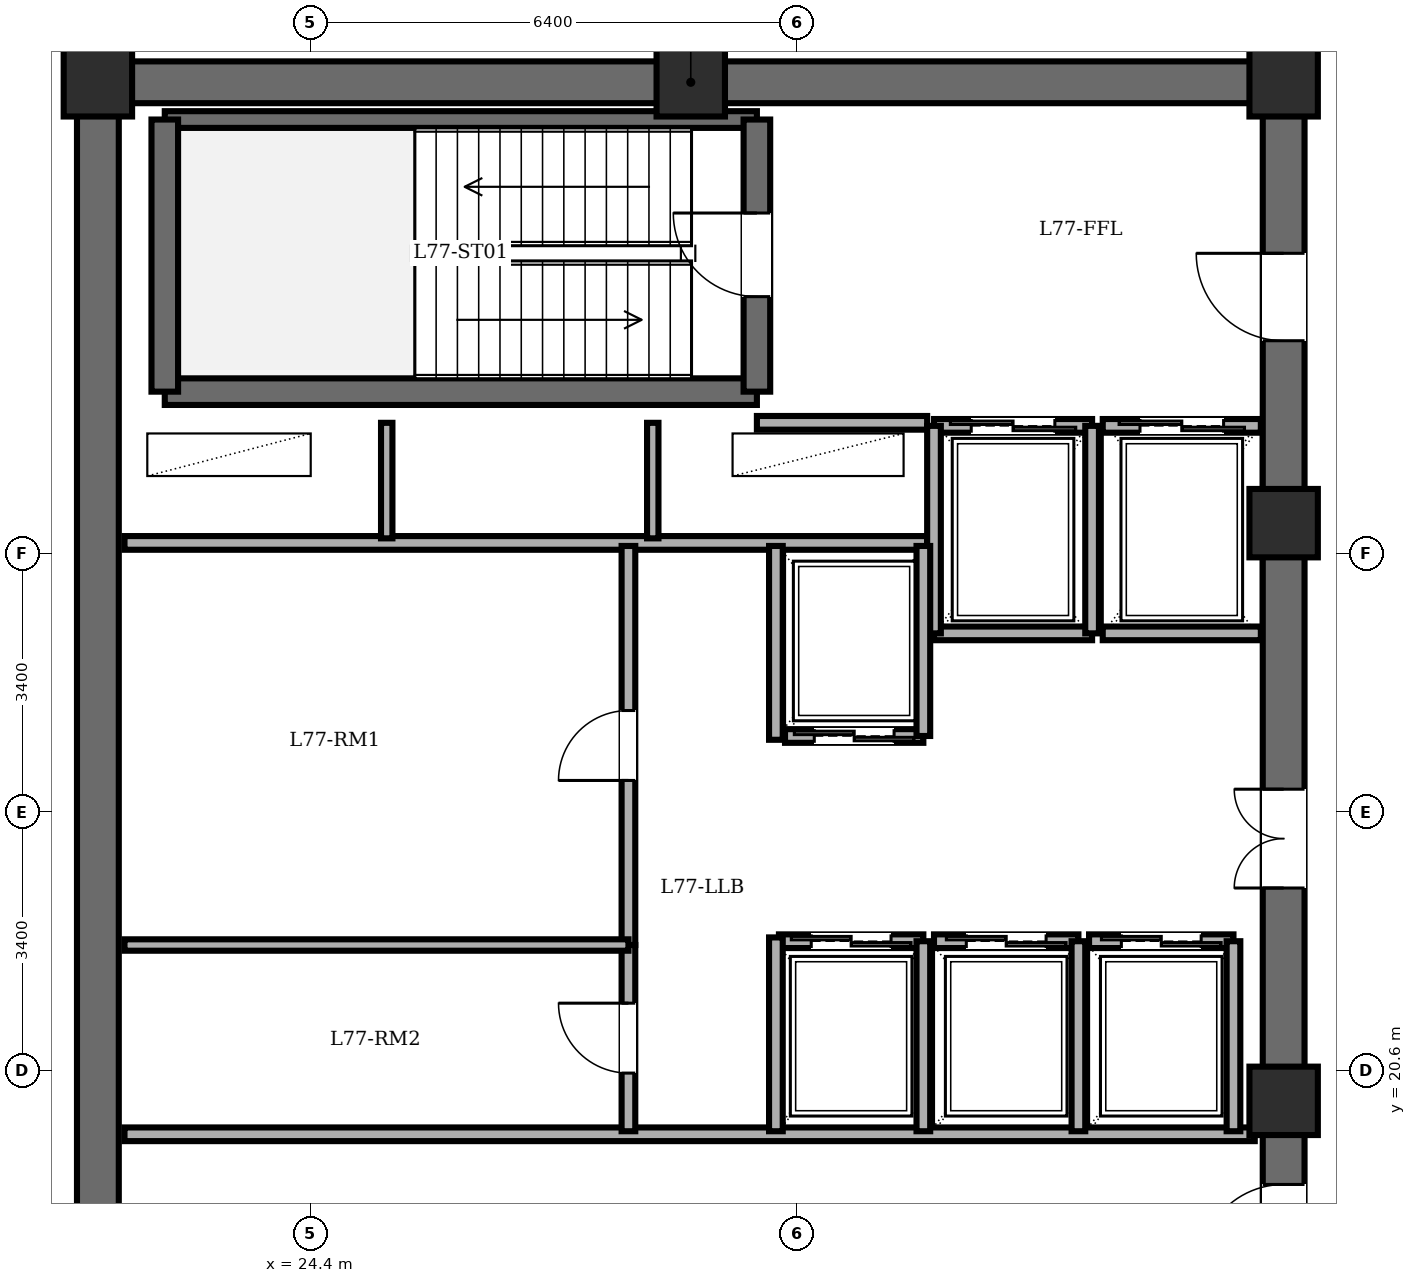
"""IFC4 building model, lengths in metres.
Left out: names, types, materials, properties, quantities, classifications, styles, units other than length and angle.
Written with IfcOpenShell. Run it as: python <this file> out.ifc"""

import sys

from ifc_helpers import new_model, si_unit, direction, frame, frame_2d, origin, origin_2d, place, context, subcontext, project, spatial, rectangle, extrude, element, fill, save


model = new_model("IFC4")
c1 = context("Model", 3, precision=1e-05, world=origin(), true_north=direction((0.0, 1.0)))
c2 = subcontext(c1, "Body", "Model", "MODEL_VIEW")
j1 = project(units=[si_unit("LENGTHUNIT", "METRE"), si_unit("PLANEANGLEUNIT", "RADIAN")], contexts=[c1])
p1 = place(None, origin())
s1 = spatial("IfcSite", under=j1, at=p1, CompositionType="ELEMENT")
p2 = place(p1, origin())
s2 = spatial("IfcBuilding", under=s1, at=p2, CompositionType="ELEMENT")
p3 = place(p2, frame((0.0, 0.0, 295.3)))
s3 = spatial("IfcBuildingStorey", under=s2, at=p3, CompositionType="ELEMENT", Elevation=295.3)
for number, where, z_axis, x_axis in (
    (1, (37.2, 20.2, 0.0), (0.0, 0.0, 1.0), (1.0, 0.0, 0.0)),
    (2, (37.2, 27.8, 0.0), (0.0, 0.0, 1.0), (1.0, 0.0, 0.0)),
    (3, (37.2, 33.6, 0.0), (0.0, 0.0, 1.0), (1.0, 0.0, 0.0)),
    (4, (29.4, 33.6, 0.0), (0.0, 0.0, 1.0), (1.0, 0.0, 0.0)),
    (5, (21.6, 33.6, 0.0), (0.0, 0.0, 1.0), (1.0, 0.0, 0.0)),
):
    element("IfcColumn", number, at=place(p3, frame(where, z_axis=z_axis, x_axis=x_axis)), inside=s3, PredefinedType="COLUMN", context=c2, shape_type="SweptSolid", body=[
        extrude(rectangle(XDim=0.9, YDim=0.9, at=origin_2d()), origin(), (0.0, 0.0, 1.0), 5.1),
    ])
p4 = place(p3, frame((21.6, 14.4, 0.0), z_axis=(0.0, 0.0, 1.0), x_axis=(0.0, 1.0, 0.0)))
e6 = element("IfcWall", 6, at=p4, inside=s3, PredefinedType="SHEAR", context=c2, shape_type="SweptSolid", body=[
    extrude(rectangle(XDim=19.2, YDim=0.55, at=frame_2d((9.6, 0.0))), origin(), (0.0, 0.0, 1.0), 4.85),
])
p5 = place(p3, frame((21.6, 33.6, 0.0), z_axis=(0.0, 0.0, 1.0), x_axis=(1.0, 0.0, 0.0)))
e7 = element("IfcWall", 7, at=p5, inside=s3, PredefinedType="SHEAR", context=c2, shape_type="SweptSolid", body=[
    extrude(rectangle(XDim=15.6, YDim=0.55, at=frame_2d((7.8, 0.0))), origin(), (0.0, 0.0, 1.0), 4.85),
])
p6 = place(p3, frame((37.2, 14.4, 0.0), z_axis=(0.0, 0.0, 1.0), x_axis=(0.0, 1.0, 0.0)))
e8 = element("IfcWall", 8, at=p6, inside=s3, PredefinedType="SHEAR", context=c2, shape_type="SweptSolid", body=[
    extrude(rectangle(XDim=19.2, YDim=0.55, at=frame_2d((9.6, 0.0))), origin(), (0.0, 0.0, 1.0), 4.85),
])
p7 = place(p6, frame((15.8, 0.0, 0.0)))
e9 = element("IfcOpeningElement", 9, at=p7, cuts=e8, PredefinedType="OPENING", context=c2, shape_type="SweptSolid", body=[
    extrude(rectangle(XDim=1.15, YDim=2.15, at=frame_2d((0.575, 1.075))), frame((0.0, 0.285, 0.0), z_axis=(0.0, -1.0, 0.0), x_axis=(1.0, 0.0, 0.0)), (0.0, 0.0, 1.0), 0.57),
])
p8 = place(p6, frame((3.6, 0.0, 0.0)))
e10 = element("IfcOpeningElement", 10, at=p8, cuts=e8, PredefinedType="OPENING", context=c2, shape_type="SweptSolid", body=[
    extrude(rectangle(XDim=1.1, YDim=2.15, at=frame_2d((0.55, 1.075))), frame((0.0, 0.285, 0.0), z_axis=(0.0, -1.0, 0.0), x_axis=(1.0, 0.0, 0.0)), (0.0, 0.0, 1.0), 0.57),
])
p9 = place(p6, frame((8.6, 0.0, 0.0)))
e11 = element("IfcOpeningElement", 11, at=p9, cuts=e8, PredefinedType="OPENING", context=c2, shape_type="SweptSolid", body=[
    extrude(rectangle(XDim=1.3, YDim=2.2, at=frame_2d((0.65, 1.1))), frame((0.0, 0.285, 0.0), z_axis=(0.0, -1.0, 0.0), x_axis=(1.0, 0.0, 0.0)), (0.0, 0.0, 1.0), 0.57),
])
p10 = place(p3, frame((22.48, 29.53, 0.0), z_axis=(0.0, 0.0, 1.0), x_axis=(1.0, 0.0, 0.0)))
e12 = element("IfcWall", 12, at=p10, inside=s3, PredefinedType="SOLIDWALL", context=c2, shape_type="SweptSolid", body=[
    extrude(rectangle(XDim=7.79, YDim=0.35, at=frame_2d((3.895, 0.0))), origin(), (0.0, 0.0, 1.0), 4.85),
])
p11 = place(p3, frame((22.48, 33.11, 0.0), z_axis=(0.0, 0.0, 1.0), x_axis=(1.0, 0.0, 0.0)))
e13 = element("IfcWall", 13, at=p11, inside=s3, PredefinedType="PARTITIONING", context=c2, shape_type="SweptSolid", body=[
    extrude(rectangle(XDim=7.79, YDim=0.22, at=frame_2d((3.895, 0.0))), origin(), (0.0, 0.0, 1.0), 4.85),
])
p12 = place(p3, frame((22.48, 29.53, 0.0), z_axis=(0.0, 0.0, 1.0), x_axis=(0.0, 1.0, 0.0)))
e14 = element("IfcWall", 14, at=p12, inside=s3, PredefinedType="SOLIDWALL", context=c2, shape_type="SweptSolid", body=[
    extrude(rectangle(XDim=3.58, YDim=0.35, at=frame_2d((1.79, 0.0))), origin(), (0.0, 0.0, 1.0), 4.85),
])
p13 = place(p3, frame((30.27, 29.53, 0.0), z_axis=(0.0, 0.0, 1.0), x_axis=(0.0, 1.0, 0.0)))
e15 = element("IfcWall", 15, at=p13, inside=s3, PredefinedType="SOLIDWALL", context=c2, shape_type="SweptSolid", body=[
    extrude(rectangle(XDim=3.58, YDim=0.35, at=frame_2d((1.79, 0.0))), origin(), (0.0, 0.0, 1.0), 4.85),
])
p14 = place(p13, frame((1.25, 0.0, 0.0)))
e16 = element("IfcOpeningElement", 16, at=p14, cuts=e15, PredefinedType="OPENING", context=c2, shape_type="SweptSolid", body=[
    extrude(rectangle(XDim=1.1, YDim=2.15, at=frame_2d((0.55, 1.075))), frame((0.0, 0.185, 0.0), z_axis=(0.0, -1.0, 0.0), x_axis=(1.0, 0.0, 0.0)), (0.0, 0.0, 1.0), 0.37),
])
p15 = place(p3, frame((30.27, 29.12, 0.0), z_axis=(0.0, 0.0, 1.0), x_axis=(1.0, 0.0, 0.0)))
e17 = element("IfcWall", 17, at=p15, inside=s3, PredefinedType="PARTITIONING", context=c2, shape_type="SweptSolid", body=[
    extrude(rectangle(XDim=2.24, YDim=0.18, at=frame_2d((1.12, 0.0))), origin(), (0.0, 0.0, 1.0), 4.85),
])
p16 = place(p3, frame((21.95, 27.54, 0.0), z_axis=(0.0, 0.0, 1.0), x_axis=(1.0, 0.0, 0.0)))
e18 = element("IfcWall", 18, at=p16, inside=s3, PredefinedType="PARTITIONING", context=c2, shape_type="SweptSolid", body=[
    extrude(rectangle(XDim=10.56, YDim=0.18, at=frame_2d((5.28, 0.0))), origin(), (0.0, 0.0, 1.0), 4.85),
])
for number, where, z_axis, x_axis in (
    (19, (25.4, 27.6, 0.0), (0.0, 0.0, 1.0), (0.0, 1.0, 0.0)),
    (20, (28.9, 27.6, 0.0), (0.0, 0.0, 1.0), (0.0, 1.0, 0.0)),
):
    element("IfcWall", number, at=place(p3, frame(where, z_axis=z_axis, x_axis=x_axis)), inside=s3, PredefinedType="PARTITIONING", context=c2, shape_type="SweptSolid", body=[
        extrude(rectangle(XDim=1.52, YDim=0.15, at=frame_2d((0.76, 0.0))), origin(), (0.0, 0.0, 1.0), 4.85),
    ])
p17 = place(p3, frame((21.95, 19.76, 0.0), z_axis=(0.0, 0.0, 1.0), x_axis=(1.0, 0.0, 0.0)))
e21 = element("IfcWall", 21, at=p17, inside=s3, PredefinedType="PARTITIONING", context=c2, shape_type="SweptSolid", body=[
    extrude(rectangle(XDim=14.87, YDim=0.18, at=frame_2d((7.435, 0.0))), origin(), (0.0, 0.0, 1.0), 4.85),
])
p18 = place(p3, frame((32.6, 29.08, 0.0), z_axis=(0.0, 0.0, 1.0), x_axis=(1.0, 0.0, 0.0)))
e22 = element("IfcWall", 22, at=p18, inside=s3, PredefinedType="PARTITIONING", context=c2, shape_type="SweptSolid", body=[
    extrude(rectangle(XDim=2.08, YDim=0.18, at=frame_2d((1.04, 0.0))), origin(), (0.0, 0.0, 1.0), 4.85),
])
p19 = place(p18, frame((0.49, 0.0, 0.0)))
e23 = element("IfcOpeningElement", 23, at=p19, cuts=e22, PredefinedType="OPENING", context=c2, shape_type="SweptSolid", body=[
    extrude(rectangle(XDim=1.1, YDim=2.2, at=frame_2d((0.55, 1.1))), frame((0.0, 0.1, 0.0), z_axis=(0.0, -1.0, 0.0), x_axis=(1.0, 0.0, 0.0)), (0.0, 0.0, 1.0), 0.2),
])
p20 = place(p3, frame((34.68, 26.35, 0.0), z_axis=(0.0, 0.0, 1.0), x_axis=(-1.0, 0.0, 0.0)))
e24 = element("IfcWall", 24, at=p20, inside=s3, PredefinedType="PARTITIONING", context=c2, shape_type="SweptSolid", body=[
    extrude(rectangle(XDim=2.08, YDim=0.18, at=frame_2d((1.04, 0.0))), origin(), (0.0, 0.0, 1.0), 4.85),
])
for number, where, z_axis, x_axis in (
    (25, (34.68, 26.35, 0.0), (0.0, 0.0, 1.0), (0.0, 1.0, 0.0)),
    (26, (32.6, 29.08, 0.0), (0.0, 0.0, 1.0), (0.0, -1.0, 0.0)),
):
    element("IfcWall", number, at=place(p3, frame(where, z_axis=z_axis, x_axis=x_axis)), inside=s3, PredefinedType="PARTITIONING", context=c2, shape_type="SweptSolid", body=[
        extrude(rectangle(XDim=2.73, YDim=0.18, at=frame_2d((1.365, 0.0))), origin(), (0.0, 0.0, 1.0), 4.85),
    ])
p21 = place(p3, frame((34.82, 29.08, 0.0), z_axis=(0.0, 0.0, 1.0), x_axis=(1.0, 0.0, 0.0)))
e27 = element("IfcWall", 27, at=p21, inside=s3, PredefinedType="PARTITIONING", context=c2, shape_type="SweptSolid", body=[
    extrude(rectangle(XDim=2.08, YDim=0.18, at=frame_2d((1.04, 0.0))), origin(), (0.0, 0.0, 1.0), 4.85),
])
p22 = place(p21, frame((0.49, 0.0, 0.0)))
e28 = element("IfcOpeningElement", 28, at=p22, cuts=e27, PredefinedType="OPENING", context=c2, shape_type="SweptSolid", body=[
    extrude(rectangle(XDim=1.1, YDim=2.2, at=frame_2d((0.55, 1.1))), frame((0.0, 0.1, 0.0), z_axis=(0.0, -1.0, 0.0), x_axis=(1.0, 0.0, 0.0)), (0.0, 0.0, 1.0), 0.2),
])
p23 = place(p3, frame((36.9, 26.35, 0.0), z_axis=(0.0, 0.0, 1.0), x_axis=(-1.0, 0.0, 0.0)))
e29 = element("IfcWall", 29, at=p23, inside=s3, PredefinedType="PARTITIONING", context=c2, shape_type="SweptSolid", body=[
    extrude(rectangle(XDim=2.08, YDim=0.18, at=frame_2d((1.04, 0.0))), origin(), (0.0, 0.0, 1.0), 4.85),
])
p24 = place(p3, frame((32.46, 25.0, 0.0), z_axis=(0.0, 0.0, 1.0), x_axis=(-1.0, 0.0, 0.0)))
e30 = element("IfcWall", 30, at=p24, inside=s3, PredefinedType="PARTITIONING", context=c2, shape_type="SweptSolid", body=[
    extrude(rectangle(XDim=1.82, YDim=0.18, at=frame_2d((0.91, 0.0))), origin(), (0.0, 0.0, 1.0), 4.85),
])
p25 = place(p24, frame((0.385, 0.0, 0.0)))
e31 = element("IfcOpeningElement", 31, at=p25, cuts=e30, PredefinedType="OPENING", context=c2, shape_type="SweptSolid", body=[
    extrude(rectangle(XDim=1.05, YDim=2.2, at=frame_2d((0.525, 1.1))), frame((0.0, 0.1, 0.0), z_axis=(0.0, -1.0, 0.0), x_axis=(1.0, 0.0, 0.0)), (0.0, 0.0, 1.0), 0.2),
])
p26 = place(p3, frame((32.46, 25.0, 0.0), z_axis=(0.0, 0.0, 1.0), x_axis=(0.0, 1.0, 0.0)))
e32 = element("IfcWall", 32, at=p26, inside=s3, PredefinedType="PARTITIONING", context=c2, shape_type="SweptSolid", body=[
    extrude(rectangle(XDim=2.5, YDim=0.18, at=frame_2d((1.25, 0.0))), origin(), (0.0, 0.0, 1.0), 4.85),
])
p27 = place(p3, frame((30.56, 22.3, 0.0), z_axis=(0.0, 0.0, 1.0), x_axis=(1.0, 0.0, 0.0)))
e33 = element("IfcWall", 33, at=p27, inside=s3, PredefinedType="PARTITIONING", context=c2, shape_type="SweptSolid", body=[
    extrude(rectangle(XDim=1.9, YDim=0.18, at=frame_2d((0.95, 0.0))), origin(), (0.0, 0.0, 1.0), 4.85),
])
p28 = place(p27, frame((0.425, 0.0, 0.0)))
e34 = element("IfcOpeningElement", 34, at=p28, cuts=e33, PredefinedType="OPENING", context=c2, shape_type="SweptSolid", body=[
    extrude(rectangle(XDim=1.05, YDim=2.2, at=frame_2d((0.525, 1.1))), frame((0.0, 0.1, 0.0), z_axis=(0.0, -1.0, 0.0), x_axis=(1.0, 0.0, 0.0)), (0.0, 0.0, 1.0), 0.2),
])
p29 = place(p3, frame((32.46, 19.8, 0.0), z_axis=(0.0, 0.0, 1.0), x_axis=(0.0, 1.0, 0.0)))
e35 = element("IfcWall", 35, at=p29, inside=s3, PredefinedType="PARTITIONING", context=c2, shape_type="SweptSolid", body=[
    extrude(rectangle(XDim=2.5, YDim=0.18, at=frame_2d((1.25, 0.0))), origin(), (0.0, 0.0, 1.0), 4.85),
])
p30 = place(p3, frame((32.6, 22.3, 0.0), z_axis=(0.0, 0.0, 1.0), x_axis=(1.0, 0.0, 0.0)))
e36 = element("IfcWall", 36, at=p30, inside=s3, PredefinedType="PARTITIONING", context=c2, shape_type="SweptSolid", body=[
    extrude(rectangle(XDim=1.9, YDim=0.18, at=frame_2d((0.95, 0.0))), origin(), (0.0, 0.0, 1.0), 4.85),
])
p31 = place(p30, frame((0.425, 0.0, 0.0)))
e37 = element("IfcOpeningElement", 37, at=p31, cuts=e36, PredefinedType="OPENING", context=c2, shape_type="SweptSolid", body=[
    extrude(rectangle(XDim=1.05, YDim=2.2, at=frame_2d((0.525, 1.1))), frame((0.0, 0.1, 0.0), z_axis=(0.0, -1.0, 0.0), x_axis=(1.0, 0.0, 0.0)), (0.0, 0.0, 1.0), 0.2),
])
p32 = place(p3, frame((34.5, 19.8, 0.0), z_axis=(0.0, 0.0, 1.0), x_axis=(0.0, 1.0, 0.0)))
e38 = element("IfcWall", 38, at=p32, inside=s3, PredefinedType="PARTITIONING", context=c2, shape_type="SweptSolid", body=[
    extrude(rectangle(XDim=2.5, YDim=0.18, at=frame_2d((1.25, 0.0))), origin(), (0.0, 0.0, 1.0), 4.85),
])
p33 = place(p3, frame((34.64, 22.3, 0.0), z_axis=(0.0, 0.0, 1.0), x_axis=(1.0, 0.0, 0.0)))
e39 = element("IfcWall", 39, at=p33, inside=s3, PredefinedType="PARTITIONING", context=c2, shape_type="SweptSolid", body=[
    extrude(rectangle(XDim=1.9, YDim=0.18, at=frame_2d((0.95, 0.0))), origin(), (0.0, 0.0, 1.0), 4.85),
])
p34 = place(p33, frame((0.425, 0.0, 0.0)))
e40 = element("IfcOpeningElement", 40, at=p34, cuts=e39, PredefinedType="OPENING", context=c2, shape_type="SweptSolid", body=[
    extrude(rectangle(XDim=1.05, YDim=2.2, at=frame_2d((0.525, 1.1))), frame((0.0, 0.1, 0.0), z_axis=(0.0, -1.0, 0.0), x_axis=(1.0, 0.0, 0.0)), (0.0, 0.0, 1.0), 0.2),
])
p35 = place(p3, frame((36.54, 19.8, 0.0), z_axis=(0.0, 0.0, 1.0), x_axis=(0.0, 1.0, 0.0)))
e41 = element("IfcWall", 41, at=p35, inside=s3, PredefinedType="PARTITIONING", context=c2, shape_type="SweptSolid", body=[
    extrude(rectangle(XDim=2.5, YDim=0.18, at=frame_2d((1.25, 0.0))), origin(), (0.0, 0.0, 1.0), 4.85),
])
for number, where, z_axis, x_axis in (
    (42, (30.52, 24.95, 0.0), (0.0, 0.0, 1.0), (0.0, 1.0, 0.0)),
    (43, (30.52, 19.8, 0.0), (0.0, 0.0, 1.0), (0.0, 1.0, 0.0)),
):
    element("IfcWall", number, at=place(p3, frame(where, z_axis=z_axis, x_axis=x_axis)), inside=s3, PredefinedType="PARTITIONING", context=c2, shape_type="SweptSolid", body=[
        extrude(rectangle(XDim=2.55, YDim=0.18, at=frame_2d((1.275, 0.0))), origin(), (0.0, 0.0, 1.0), 4.85),
    ])
p36 = place(p3, frame((28.58, 22.25, 0.0), z_axis=(0.0, 0.0, 1.0), x_axis=(0.0, 1.0, 0.0)))
e44 = element("IfcWall", 44, at=p36, inside=s3, PredefinedType="PARTITIONING", context=c2, shape_type="SweptSolid", body=[
    extrude(rectangle(XDim=5.25, YDim=0.18, at=frame_2d((2.625, 0.0))), origin(), (0.0, 0.0, 1.0), 4.85),
])
p37 = place(p36, frame((2.165, 0.0, 0.0)))
e45 = element("IfcOpeningElement", 45, at=p37, cuts=e44, PredefinedType="OPENING", context=c2, shape_type="SweptSolid", body=[
    extrude(rectangle(XDim=0.92, YDim=2.1, at=frame_2d((0.46, 1.05))), frame((0.0, 0.1, 0.0), z_axis=(0.0, -1.0, 0.0), x_axis=(1.0, 0.0, 0.0)), (0.0, 0.0, 1.0), 0.2),
])
p38 = place(p3, frame((28.58, 19.8, 0.0), z_axis=(0.0, 0.0, 1.0), x_axis=(0.0, 1.0, 0.0)))
e46 = element("IfcWall", 46, at=p38, inside=s3, PredefinedType="PARTITIONING", context=c2, shape_type="SweptSolid", body=[
    extrude(rectangle(XDim=2.45, YDim=0.18, at=frame_2d((1.225, 0.0))), origin(), (0.0, 0.0, 1.0), 4.85),
])
p39 = place(p38, frame((0.765, 0.0, 0.0)))
e47 = element("IfcOpeningElement", 47, at=p39, cuts=e46, PredefinedType="OPENING", context=c2, shape_type="SweptSolid", body=[
    extrude(rectangle(XDim=0.92, YDim=2.1, at=frame_2d((0.46, 1.05))), frame((0.0, 0.1, 0.0), z_axis=(0.0, -1.0, 0.0), x_axis=(1.0, 0.0, 0.0)), (0.0, 0.0, 1.0), 0.2),
])
p40 = place(p3, frame((21.95, 22.25, 0.0), z_axis=(0.0, 0.0, 1.0), x_axis=(1.0, 0.0, 0.0)))
e48 = element("IfcWall", 48, at=p40, inside=s3, PredefinedType="PARTITIONING", context=c2, shape_type="SweptSolid", body=[
    extrude(rectangle(XDim=6.63, YDim=0.15, at=frame_2d((3.315, 0.0))), origin(), (0.0, 0.0, 1.0), 4.85),
])
p41 = place(p14, origin())
e49 = element("IfcDoor", 49, at=p41, inside=s3, OperationType="SINGLE_SWING_RIGHT", PredefinedType="DOOR", context=c2, shape_type="SweptSolid", body=[
    extrude(rectangle(XDim=1.1, YDim=2.15, at=frame_2d((0.55, 1.075))), frame((0.0, 0.025, 0.0), z_axis=(0.0, -1.0, 0.0), x_axis=(1.0, 0.0, 0.0)), (0.0, 0.0, 1.0), 0.05),
])
fill(e16, e49)
p42 = place(p7, origin())
e50 = element("IfcDoor", 50, at=p42, inside=s3, OperationType="SINGLE_SWING_RIGHT", PredefinedType="DOOR", context=c2, shape_type="SweptSolid", body=[
    extrude(rectangle(XDim=1.15, YDim=2.15, at=frame_2d((0.575, 1.075))), frame((0.0, 0.025, 0.0), z_axis=(0.0, -1.0, 0.0), x_axis=(1.0, 0.0, 0.0)), (0.0, 0.0, 1.0), 0.05),
])
fill(e9, e50)
p43 = place(p8, origin())
e51 = element("IfcDoor", 51, at=p43, inside=s3, OperationType="SINGLE_SWING_LEFT", PredefinedType="DOOR", context=c2, shape_type="SweptSolid", body=[
    extrude(rectangle(XDim=1.1, YDim=2.15, at=frame_2d((0.55, 1.075))), frame((0.0, 0.025, 0.0), z_axis=(0.0, -1.0, 0.0), x_axis=(1.0, 0.0, 0.0)), (0.0, 0.0, 1.0), 0.05),
])
fill(e10, e51)
p44 = place(p19, origin())
e52 = element("IfcDoor", 52, at=p44, inside=s3, OperationType="DOUBLE_DOOR_SLIDING", PredefinedType="DOOR", context=c2, shape_type="SweptSolid", body=[
    extrude(rectangle(XDim=1.1, YDim=2.2, at=frame_2d((0.55, 1.1))), frame((0.0, 0.025, 0.0), z_axis=(0.0, -1.0, 0.0), x_axis=(1.0, 0.0, 0.0)), (0.0, 0.0, 1.0), 0.05),
])
fill(e23, e52)
p45 = place(p22, origin())
e53 = element("IfcDoor", 53, at=p45, inside=s3, OperationType="DOUBLE_DOOR_SLIDING", PredefinedType="DOOR", context=c2, shape_type="SweptSolid", body=[
    extrude(rectangle(XDim=1.1, YDim=2.2, at=frame_2d((0.55, 1.1))), frame((0.0, 0.025, 0.0), z_axis=(0.0, -1.0, 0.0), x_axis=(1.0, 0.0, 0.0)), (0.0, 0.0, 1.0), 0.05),
])
fill(e28, e53)
p46 = place(p25, origin())
e54 = element("IfcDoor", 54, at=p46, inside=s3, OperationType="DOUBLE_DOOR_SLIDING", PredefinedType="DOOR", context=c2, shape_type="SweptSolid", body=[
    extrude(rectangle(XDim=1.05, YDim=2.2, at=frame_2d((0.525, 1.1))), frame((0.0, 0.025, 0.0), z_axis=(0.0, -1.0, 0.0), x_axis=(1.0, 0.0, 0.0)), (0.0, 0.0, 1.0), 0.05),
])
fill(e31, e54)
p47 = place(p28, origin())
e55 = element("IfcDoor", 55, at=p47, inside=s3, OperationType="DOUBLE_DOOR_SLIDING", PredefinedType="DOOR", context=c2, shape_type="SweptSolid", body=[
    extrude(rectangle(XDim=1.05, YDim=2.2, at=frame_2d((0.525, 1.1))), frame((0.0, 0.025, 0.0), z_axis=(0.0, -1.0, 0.0), x_axis=(1.0, 0.0, 0.0)), (0.0, 0.0, 1.0), 0.05),
])
fill(e34, e55)
p48 = place(p31, origin())
e56 = element("IfcDoor", 56, at=p48, inside=s3, OperationType="DOUBLE_DOOR_SLIDING", PredefinedType="DOOR", context=c2, shape_type="SweptSolid", body=[
    extrude(rectangle(XDim=1.05, YDim=2.2, at=frame_2d((0.525, 1.1))), frame((0.0, 0.025, 0.0), z_axis=(0.0, -1.0, 0.0), x_axis=(1.0, 0.0, 0.0)), (0.0, 0.0, 1.0), 0.05),
])
fill(e37, e56)
p49 = place(p34, origin())
e57 = element("IfcDoor", 57, at=p49, inside=s3, OperationType="DOUBLE_DOOR_SLIDING", PredefinedType="DOOR", context=c2, shape_type="SweptSolid", body=[
    extrude(rectangle(XDim=1.05, YDim=2.2, at=frame_2d((0.525, 1.1))), frame((0.0, 0.025, 0.0), z_axis=(0.0, -1.0, 0.0), x_axis=(1.0, 0.0, 0.0)), (0.0, 0.0, 1.0), 0.05),
])
fill(e40, e57)
p50 = place(p37, origin())
e58 = element("IfcDoor", 58, at=p50, inside=s3, OperationType="SINGLE_SWING_LEFT", PredefinedType="DOOR", context=c2, shape_type="SweptSolid", body=[
    extrude(rectangle(XDim=0.92, YDim=2.1, at=frame_2d((0.46, 1.05))), frame((0.0, 0.025, 0.0), z_axis=(0.0, -1.0, 0.0), x_axis=(1.0, 0.0, 0.0)), (0.0, 0.0, 1.0), 0.05),
])
fill(e45, e58)
p51 = place(p39, origin())
e59 = element("IfcDoor", 59, at=p51, inside=s3, OperationType="SINGLE_SWING_RIGHT", PredefinedType="DOOR", context=c2, shape_type="SweptSolid", body=[
    extrude(rectangle(XDim=0.92, YDim=2.1, at=frame_2d((0.46, 1.05))), frame((0.0, 0.025, 0.0), z_axis=(0.0, -1.0, 0.0), x_axis=(1.0, 0.0, 0.0)), (0.0, 0.0, 1.0), 0.05),
])
fill(e47, e59)
p52 = place(p9, origin())
e60 = element("IfcDoor", 60, at=p52, inside=s3, OperationType="DOUBLE_DOOR_SINGLE_SWING", PredefinedType="DOOR", context=c2, shape_type="SweptSolid", body=[
    extrude(rectangle(XDim=1.3, YDim=2.2, at=frame_2d((0.65, 1.1))), frame((0.0, 0.025, 0.0), z_axis=(0.0, -1.0, 0.0), x_axis=(1.0, 0.0, 0.0)), (0.0, 0.0, 1.0), 0.05),
])
fill(e11, e60)
save(model, sys.argv[1])
